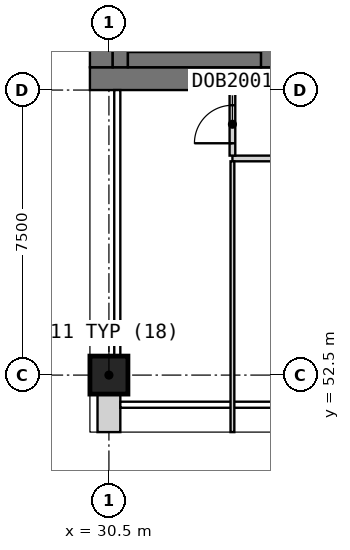
"""IFC4 building model, lengths in metres.
Left out: names, types, materials, properties, quantities, classifications, styles, units other than length and angle.
Written with IfcOpenShell. Run it as: python <this file> out.ifc"""

import sys

from ifc_helpers import new_model, si_unit, direction, frame, frame_2d, origin, origin_2d, place, context, subcontext, project, spatial, rectangle, extrude, element, fill, save


model = new_model("IFC4")
c1 = context("Model", 3, precision=1e-05, world=origin(), true_north=direction((0.0, 1.0)))
c2 = subcontext(c1, "Body", "Model", "MODEL_VIEW")
j1 = project(units=[si_unit("LENGTHUNIT", "METRE"), si_unit("PLANEANGLEUNIT", "RADIAN")], contexts=[c1])
p1 = place(None, origin())
s1 = spatial("IfcSite", under=j1, at=p1, CompositionType="ELEMENT")
p2 = place(p1, origin())
s2 = spatial("IfcBuilding", under=s1, at=p2, CompositionType="ELEMENT")
p3 = place(p2, frame((0.0, 0.0, 308.7)))
s3 = spatial("IfcBuildingStorey", under=s2, at=p3, CompositionType="ELEMENT", Elevation=308.7)
p4 = place(p3, frame((30.5, 52.5, 0.0), z_axis=(0.0, 0.0, 1.0), x_axis=(1.0, 0.0, 0.0)))
e1 = element("IfcColumn", 1, at=p4, inside=s3, PredefinedType="COLUMN", context=c2, shape_type="SweptSolid", body=[
    extrude(rectangle(XDim=1.0, YDim=1.0, at=origin_2d()), origin(), (0.0, 0.0, 1.0), 6.0),
])
p5 = place(p3, frame((30.0, 60.3, 0.0), z_axis=(0.0, 0.0, 1.0), x_axis=(1.0, 0.0, 0.0)))
e2 = element("IfcWall", 2, at=p5, inside=s3, PredefinedType="SHEAR", context=c2, shape_type="SweptSolid", body=[
    extrude(rectangle(XDim=30.0, YDim=0.6, at=frame_2d((15.0, 0.0))), origin(), (0.0, 0.0, 1.0), 6.0),
])
p6 = place(p5, frame((21.9, 0.0, 0.0)))
e3 = element("IfcOpeningElement", 3, at=p6, cuts=e2, PredefinedType="OPENING", context=c2, shape_type="SweptSolid", body=[
    extrude(rectangle(XDim=1.8, YDim=2.1, at=frame_2d((0.9, 1.05))), frame((0.0, 0.31, 0.0), z_axis=(0.0, -1.0, 0.0), x_axis=(1.0, 0.0, 0.0)), (0.0, 0.0, 1.0), 0.62),
])
p7 = place(p5, frame((26.5, 0.0, 0.0)))
e4 = element("IfcOpeningElement", 4, at=p7, cuts=e2, PredefinedType="OPENING", context=c2, shape_type="SweptSolid", body=[
    extrude(rectangle(XDim=1.2, YDim=2.1, at=frame_2d((0.6, 1.05))), frame((0.0, 0.31, 0.0), z_axis=(0.0, -1.0, 0.0), x_axis=(1.0, 0.0, 0.0)), (0.0, 0.0, 1.0), 0.62),
])
p8 = place(p3, frame((30.3, 60.6, 0.0), z_axis=(0.0, 0.0, 1.0), x_axis=(0.0, 1.0, 0.0)))
e5 = element("IfcWall", 5, at=p8, inside=s3, PredefinedType="SHEAR", context=c2, shape_type="SweptSolid", body=[
    extrude(rectangle(XDim=21.3, YDim=0.6, at=frame_2d((10.65, 0.0))), origin(), (0.0, 0.0, 1.0), 6.0),
])
p9 = place(p3, frame((34.75, 60.6, 0.0), z_axis=(0.0, 0.0, 1.0), x_axis=(0.0, 1.0, 0.0)))
e6 = element("IfcWall", 6, at=p9, inside=s3, PredefinedType="SHEAR", context=c2, shape_type="SweptSolid", body=[
    extrude(rectangle(XDim=3.6, YDim=0.5, at=frame_2d((1.8, 0.0))), origin(), (0.0, 0.0, 1.0), 6.0),
])
p10 = place(p3, frame((30.5, 52.0, 0.0), z_axis=(0.0, 0.0, 1.0), x_axis=(0.0, -1.0, 0.0)))
e7 = element("IfcWall", 7, at=p10, inside=s3, PredefinedType="SOLIDWALL", context=c2, shape_type="SweptSolid", body=[
    extrude(rectangle(XDim=1.0, YDim=0.6, at=frame_2d((0.5, 0.0))), origin(), (0.0, 0.0, 1.0), 5.6),
])
p11 = place(p3, frame((30.8, 60.6, 0.0), z_axis=(0.0, 0.0, 1.0), x_axis=(0.0, 1.0, 0.0)))
e8 = element("IfcWall", 8, at=p11, inside=s3, PredefinedType="SOLIDWALL", context=c2, shape_type="SweptSolid", body=[
    extrude(rectangle(XDim=21.3, YDim=0.4, at=frame_2d((10.65, 0.0))), origin(), (0.0, 0.0, 1.0), 5.59),
])
p12 = place(p3, frame((31.0, 60.8, 0.0), z_axis=(0.0, 0.0, 1.0), x_axis=(1.0, 0.0, 0.0)))
e9 = element("IfcWall", 9, at=p12, inside=s3, PredefinedType="SOLIDWALL", context=c2, shape_type="SweptSolid", body=[
    extrude(rectangle(XDim=3.5, YDim=0.4, at=frame_2d((1.75, 0.0))), origin(), (0.0, 0.0, 1.0), 5.59),
])
p13 = place(p3, frame((33.75, 58.2, 0.0), z_axis=(0.0, 0.0, 1.0), x_axis=(1.0, 0.0, 0.0)))
e10 = element("IfcWall", 10, at=p13, inside=s3, PredefinedType="PARTITIONING", context=c2, shape_type="SweptSolid", body=[
    extrude(rectangle(XDim=28.05, YDim=0.15, at=frame_2d((14.025, 0.0))), origin(), (0.0, 0.0, 1.0), 5.6),
])
p14 = place(p13, frame((6.6, 0.0, 0.0)))
e11 = element("IfcOpeningElement", 11, at=p14, cuts=e10, PredefinedType="OPENING", context=c2, shape_type="SweptSolid", body=[
    extrude(rectangle(XDim=1.8, YDim=2.1, at=frame_2d((0.9, 1.05))), frame((0.0, 0.085, 0.0), z_axis=(0.0, -1.0, 0.0), x_axis=(1.0, 0.0, 0.0)), (0.0, 0.0, 1.0), 0.17),
])
p15 = place(p13, frame((19.725, 0.0, 0.0)))
e12 = element("IfcOpeningElement", 12, at=p15, cuts=e10, PredefinedType="OPENING", context=c2, shape_type="SweptSolid", body=[
    extrude(rectangle(XDim=1.8, YDim=2.1, at=frame_2d((0.9, 1.05))), frame((0.0, 0.085, 0.0), z_axis=(0.0, -1.0, 0.0), x_axis=(1.0, 0.0, 0.0)), (0.0, 0.0, 1.0), 0.17),
])
p16 = place(p13, frame((26.65, 0.0, 0.0)))
e13 = element("IfcOpeningElement", 13, at=p16, cuts=e10, PredefinedType="OPENING", context=c2, shape_type="SweptSolid", body=[
    extrude(rectangle(XDim=1.0, YDim=2.1, at=frame_2d((0.5, 1.05))), frame((0.0, 0.085, 0.0), z_axis=(0.0, -1.0, 0.0), x_axis=(1.0, 0.0, 0.0)), (0.0, 0.0, 1.0), 0.17),
])
p17 = place(p3, frame((33.75, 58.275, 0.0), z_axis=(0.0, 0.0, 1.0), x_axis=(0.0, 1.0, 0.0)))
e14 = element("IfcWall", 14, at=p17, inside=s3, PredefinedType="PARTITIONING", context=c2, shape_type="SweptSolid", body=[
    extrude(rectangle(XDim=1.725, YDim=0.15, at=frame_2d((0.863, 0.0))), origin(), (0.0, 0.0, 1.0), 5.6),
])
p18 = place(p17, frame((0.325, 0.0, 0.0)))
e15 = element("IfcOpeningElement", 15, at=p18, cuts=e14, PredefinedType="OPENING", context=c2, shape_type="SweptSolid", body=[
    extrude(rectangle(XDim=1.0, YDim=2.1, at=frame_2d((0.5, 1.05))), frame((0.0, 0.085, 0.0), z_axis=(0.0, -1.0, 0.0), x_axis=(1.0, 0.0, 0.0)), (0.0, 0.0, 1.0), 0.17),
])
p19 = place(p3, frame((33.75, 51.0, 0.0), z_axis=(0.0, 0.0, 1.0), x_axis=(0.0, 1.0, 0.0)))
e16 = element("IfcWall", 16, at=p19, inside=s3, PredefinedType="PARTITIONING", context=c2, shape_type="SweptSolid", body=[
    extrude(rectangle(XDim=7.125, YDim=0.1, at=frame_2d((3.562, 0.0))), origin(), (0.0, 0.0, 1.0), 5.6),
])
p20 = place(p18, origin())
e17 = element("IfcDoor", 17, at=p20, inside=s3, OperationType="SINGLE_SWING_RIGHT", PredefinedType="DOOR", context=c2, shape_type="SweptSolid", body=[
    extrude(rectangle(XDim=1.0, YDim=2.1, at=frame_2d((0.5, 1.05))), frame((0.0, 0.025, 0.0), z_axis=(0.0, -1.0, 0.0), x_axis=(1.0, 0.0, 0.0)), (0.0, 0.0, 1.0), 0.05),
])
fill(e15, e17)
save(model, sys.argv[1])
